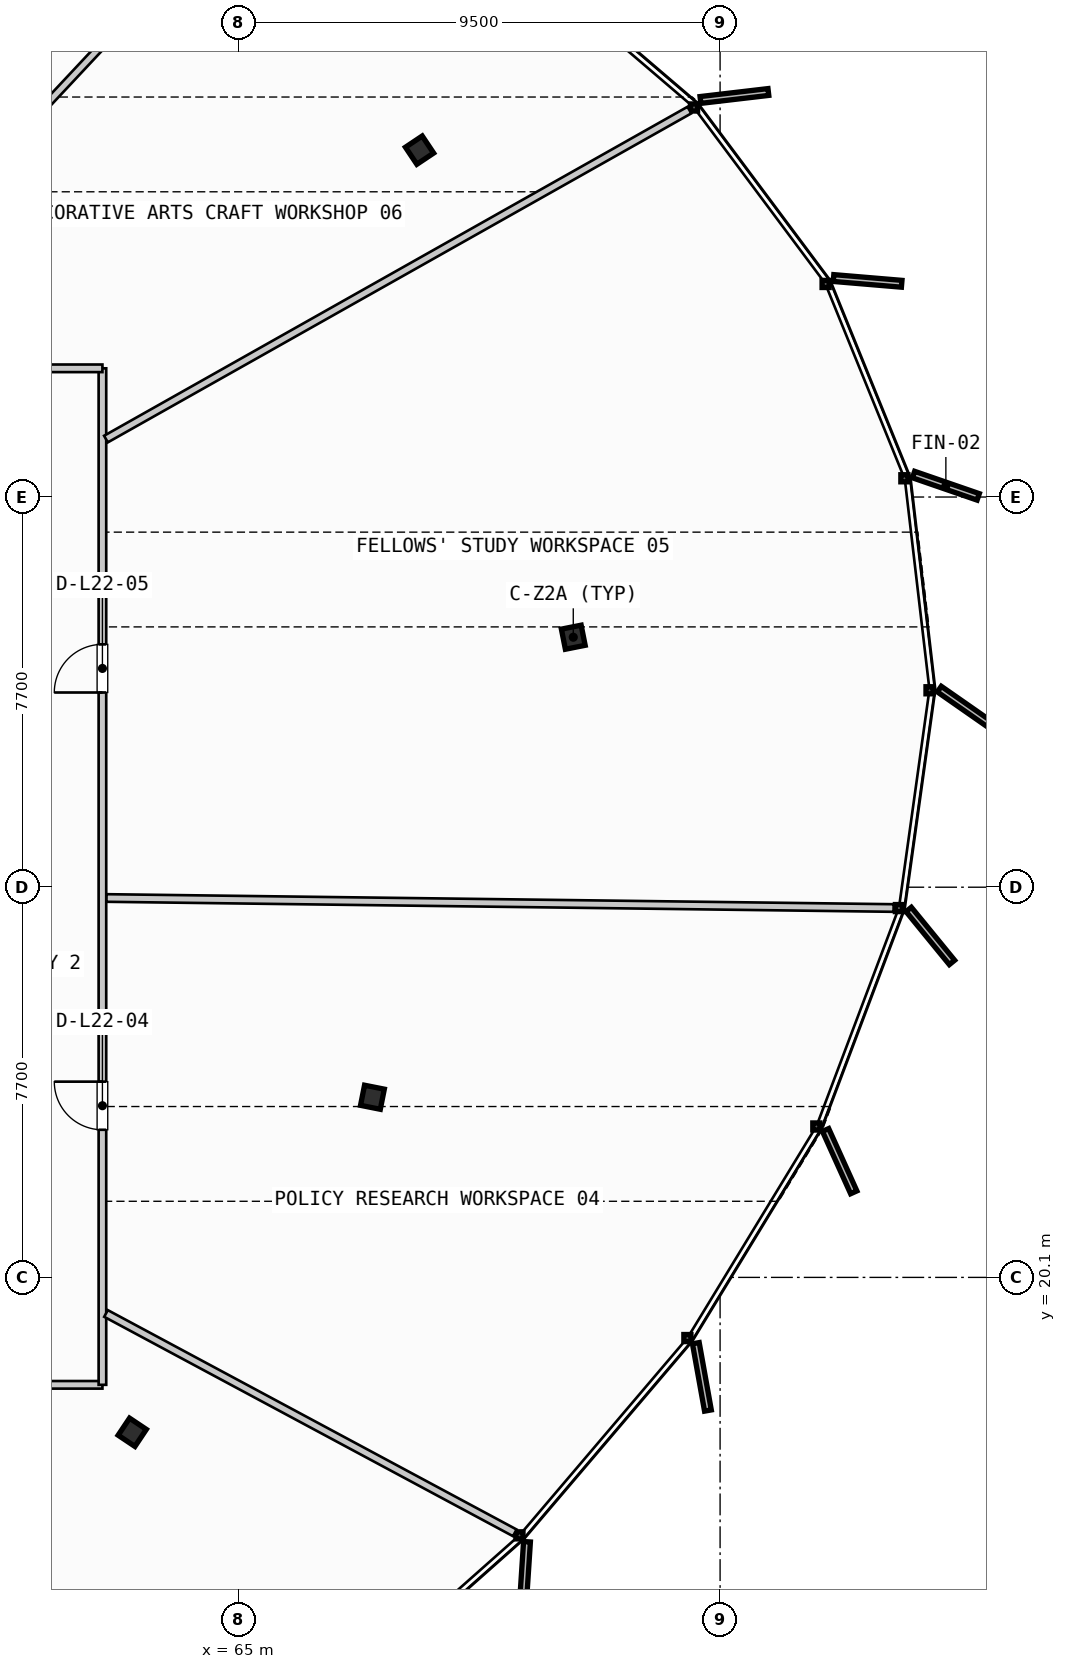
"""IFC4 building model, lengths in metres.
Left out: names, types, materials, properties, quantities, classifications, styles, units other than length and angle.
Written with IfcOpenShell. Run it as: python <this file> out.ifc"""

import sys

from ifc_helpers import new_model, si_unit, direction, frame, frame_2d, origin, origin_2d, place, context, subcontext, project, spatial, rectangle, i_section, extrude, source, transform, mapped, element, fill, save


model = new_model("IFC4")
c1 = context("Model", 3, precision=1e-05, world=origin(), true_north=direction((0.0, 1.0)))
c2 = subcontext(c1, "Body", "Model", "MODEL_VIEW")
j1 = project(units=[si_unit("LENGTHUNIT", "METRE"), si_unit("PLANEANGLEUNIT", "RADIAN")], contexts=[c1])
p1 = place(None, origin())
s1 = spatial("IfcSite", under=j1, at=p1, CompositionType="ELEMENT")
p2 = place(p1, origin())
s2 = spatial("IfcBuilding", under=s1, at=p2, CompositionType="ELEMENT")
p3 = place(p2, frame((0.0, 0.0, 92.8)))
s3 = spatial("IfcBuildingStorey", under=s2, at=p3, CompositionType="ELEMENT", Elevation=92.8)
m1 = source(origin(), c2, "Body", "SweptSolid", [
    extrude(i_section(OverallWidth=0.405, OverallDepth=0.398, WebThickness=0.035, FlangeThickness=0.056, FilletRadius=0.015, at=origin_2d()), origin(), (0.0, 0.0, 1.0), 3.35),
])
for number, where, z_axis, x_axis in (
    (1, (71.603, 32.733, 0.0), (0.0, 0.0, 1.0), (0.981, 0.195, 0.0)),
    (2, (68.569, 42.345, 0.0), (0.0, 0.0, 1.0), (0.831, 0.556, 0.0)),
    (3, (62.899, 17.043, 0.0), (0.0, 0.0, 1.0), (0.831, -0.556, 0.0)),
    (4, (67.639, 23.655, 0.0), (0.0, 0.0, 1.0), (0.981, -0.195, 0.0)),
):
    element("IfcColumn", number, at=place(p3, frame(where, z_axis=z_axis, x_axis=x_axis)), inside=s3, PredefinedType="COLUMN", context=c2, shape_type="MappedRepresentation", body=[
        mapped(m1, transform((0.0, 0.0, 0.0), scale=1.0)),
    ])
p4 = place(p3, frame((30.77, 17.98, 0.0), z_axis=(0.0, 0.0, 1.0), x_axis=(1.0, 0.0, 0.0)))
e5 = element("IfcWall", 5, at=p4, inside=s3, PredefinedType="PARTITIONING", context=c2, shape_type="SweptSolid", body=[
    extrude(rectangle(XDim=31.54, YDim=0.15, at=frame_2d((15.77, 0.0))), origin(), (0.0, 0.0, 1.0), 2.28),
])
p5 = place(p4, frame((4.848, 0.0, 0.0)))
e6 = element("IfcOpeningElement", 6, at=p5, cuts=e5, PredefinedType="OPENING", context=c2, shape_type="SweptSolid", body=[
    extrude(rectangle(XDim=0.95, YDim=2.15, at=frame_2d((0.475, 1.075))), frame((0.0, 0.085, 0.0), z_axis=(0.0, -1.0, 0.0), x_axis=(1.0, 0.0, 0.0)), (0.0, 0.0, 1.0), 0.17),
])
p6 = place(p4, frame((13.815, 0.0, 0.0)))
e7 = element("IfcOpeningElement", 7, at=p6, cuts=e5, PredefinedType="OPENING", context=c2, shape_type="SweptSolid", body=[
    extrude(rectangle(XDim=0.95, YDim=2.15, at=frame_2d((0.475, 1.075))), frame((0.0, 0.085, 0.0), z_axis=(0.0, -1.0, 0.0), x_axis=(1.0, 0.0, 0.0)), (0.0, 0.0, 1.0), 0.17),
])
p7 = place(p4, frame((24.281, 0.0, 0.0)))
e8 = element("IfcOpeningElement", 8, at=p7, cuts=e5, PredefinedType="OPENING", context=c2, shape_type="SweptSolid", body=[
    extrude(rectangle(XDim=0.95, YDim=2.15, at=frame_2d((0.475, 1.075))), frame((0.0, 0.085, 0.0), z_axis=(0.0, -1.0, 0.0), x_axis=(1.0, 0.0, 0.0)), (0.0, 0.0, 1.0), 0.17),
])
p8 = place(p3, frame((62.31, 17.98, 0.0), z_axis=(0.0, 0.0, 1.0), x_axis=(0.0, 1.0, 0.0)))
e9 = element("IfcWall", 9, at=p8, inside=s3, PredefinedType="PARTITIONING", context=c2, shape_type="SweptSolid", body=[
    extrude(rectangle(XDim=20.06, YDim=0.15, at=frame_2d((10.03, 0.0))), origin(), (0.0, 0.0, 1.0), 2.28),
])
p9 = place(p8, frame((5.033, 0.0, 0.0)))
e10 = element("IfcOpeningElement", 10, at=p9, cuts=e9, PredefinedType="OPENING", context=c2, shape_type="SweptSolid", body=[
    extrude(rectangle(XDim=0.95, YDim=2.15, at=frame_2d((0.475, 1.075))), frame((0.0, 0.085, 0.0), z_axis=(0.0, -1.0, 0.0), x_axis=(1.0, 0.0, 0.0)), (0.0, 0.0, 1.0), 0.17),
])
p10 = place(p8, frame((13.662, 0.0, 0.0)))
e11 = element("IfcOpeningElement", 11, at=p10, cuts=e9, PredefinedType="OPENING", context=c2, shape_type="SweptSolid", body=[
    extrude(rectangle(XDim=0.95, YDim=2.15, at=frame_2d((0.475, 1.075))), frame((0.0, 0.085, 0.0), z_axis=(0.0, -1.0, 0.0), x_axis=(1.0, 0.0, 0.0)), (0.0, 0.0, 1.0), 0.17),
])
p11 = place(p3, frame((62.31, 38.04, 0.0), z_axis=(0.0, 0.0, 1.0), x_axis=(-1.0, 0.0, 0.0)))
e12 = element("IfcWall", 12, at=p11, inside=s3, PredefinedType="PARTITIONING", context=c2, shape_type="SweptSolid", body=[
    extrude(rectangle(XDim=31.54, YDim=0.15, at=frame_2d((15.77, 0.0))), origin(), (0.0, 0.0, 1.0), 2.28),
])
p12 = place(p11, frame((2.805, 0.0, 0.0)))
e13 = element("IfcOpeningElement", 13, at=p12, cuts=e12, PredefinedType="OPENING", context=c2, shape_type="SweptSolid", body=[
    extrude(rectangle(XDim=0.95, YDim=2.15, at=frame_2d((0.475, 1.075))), frame((0.0, 0.085, 0.0), z_axis=(0.0, -1.0, 0.0), x_axis=(1.0, 0.0, 0.0)), (0.0, 0.0, 1.0), 0.17),
])
p13 = place(p11, frame((11.538, 0.0, 0.0)))
e14 = element("IfcOpeningElement", 14, at=p13, cuts=e12, PredefinedType="OPENING", context=c2, shape_type="SweptSolid", body=[
    extrude(rectangle(XDim=0.95, YDim=2.15, at=frame_2d((0.475, 1.075))), frame((0.0, 0.085, 0.0), z_axis=(0.0, -1.0, 0.0), x_axis=(1.0, 0.0, 0.0)), (0.0, 0.0, 1.0), 0.17),
])
p14 = place(p11, frame((24.075, 0.0, 0.0)))
e15 = element("IfcOpeningElement", 15, at=p14, cuts=e12, PredefinedType="OPENING", context=c2, shape_type="SweptSolid", body=[
    extrude(rectangle(XDim=0.95, YDim=2.15, at=frame_2d((0.475, 1.075))), frame((0.0, 0.085, 0.0), z_axis=(0.0, -1.0, 0.0), x_axis=(1.0, 0.0, 0.0)), (0.0, 0.0, 1.0), 0.17),
])
p15 = place(p3, frame((62.381, 19.388, 0.0), z_axis=(0.0, 0.0, 1.0), x_axis=(0.881148345104, -0.472839924204, 0.0)))
e16 = element("IfcWall", 16, at=p15, inside=s3, PredefinedType="PARTITIONING", context=c2, shape_type="SweptSolid", body=[
    extrude(rectangle(XDim=9.156, YDim=0.15, at=frame_2d((4.578, 0.0))), origin(), (0.0, 0.0, 1.0), 2.28),
])
p16 = place(p3, frame((62.39, 27.587, 0.0), z_axis=(0.0, 0.0, 1.0), x_axis=(0.999918782689, -0.012744725404, 0.0)))
e17 = element("IfcWall", 17, at=p16, inside=s3, PredefinedType="PARTITIONING", context=c2, shape_type="SweptSolid", body=[
    extrude(rectangle(XDim=15.536, YDim=0.15, at=frame_2d((7.768, 0.0))), origin(), (0.0, 0.0, 1.0), 2.28),
])
p17 = place(p3, frame((62.38, 36.644, 0.0), z_axis=(0.0, 0.0, 1.0), x_axis=(0.871087274925, 0.491128251543, 0.0)))
e18 = element("IfcWall", 18, at=p17, inside=s3, PredefinedType="PARTITIONING", context=c2, shape_type="SweptSolid", body=[
    extrude(rectangle(XDim=13.219, YDim=0.15, at=frame_2d((6.609, 0.0))), origin(), (0.0, 0.0, 1.0), 2.28),
])
p18 = place(p3, frame((56.385, 38.098, 0.0), z_axis=(0.0, 0.0, 1.0), x_axis=(0.683464906362, 0.729983370887, 0.0)))
e19 = element("IfcWall", 19, at=p18, inside=s3, PredefinedType="PARTITIONING", context=c2, shape_type="SweptSolid", body=[
    extrude(rectangle(XDim=14.312, YDim=0.15, at=frame_2d((7.156, 0.0))), origin(), (0.0, 0.0, 1.0), 2.28),
])
m2 = source(origin(), c2, "Body", "SweptSolid", [
    extrude(rectangle(XDim=0.95, YDim=2.15, at=frame_2d((0.475, 1.075))), frame((0.0, 0.025, 0.0), z_axis=(0.0, -1.0, 0.0), x_axis=(1.0, 0.0, 0.0)), (0.0, 0.0, 1.0), 0.05),
])
p19 = place(p9, origin())
e20 = element("IfcDoor", 20, at=p19, inside=s3, OperationType="SINGLE_SWING_RIGHT", PredefinedType="DOOR", context=c2, shape_type="MappedRepresentation", body=[
    mapped(m2, transform((0.0, 0.0, 0.0), scale=1.0)),
])
fill(e10, e20)
p20 = place(p10, origin())
e21 = element("IfcDoor", 21, at=p20, inside=s3, OperationType="SINGLE_SWING_LEFT", PredefinedType="DOOR", context=c2, shape_type="MappedRepresentation", body=[
    mapped(m2, transform((0.0, 0.0, 0.0), scale=1.0)),
])
fill(e11, e21)
save(model, sys.argv[1])
